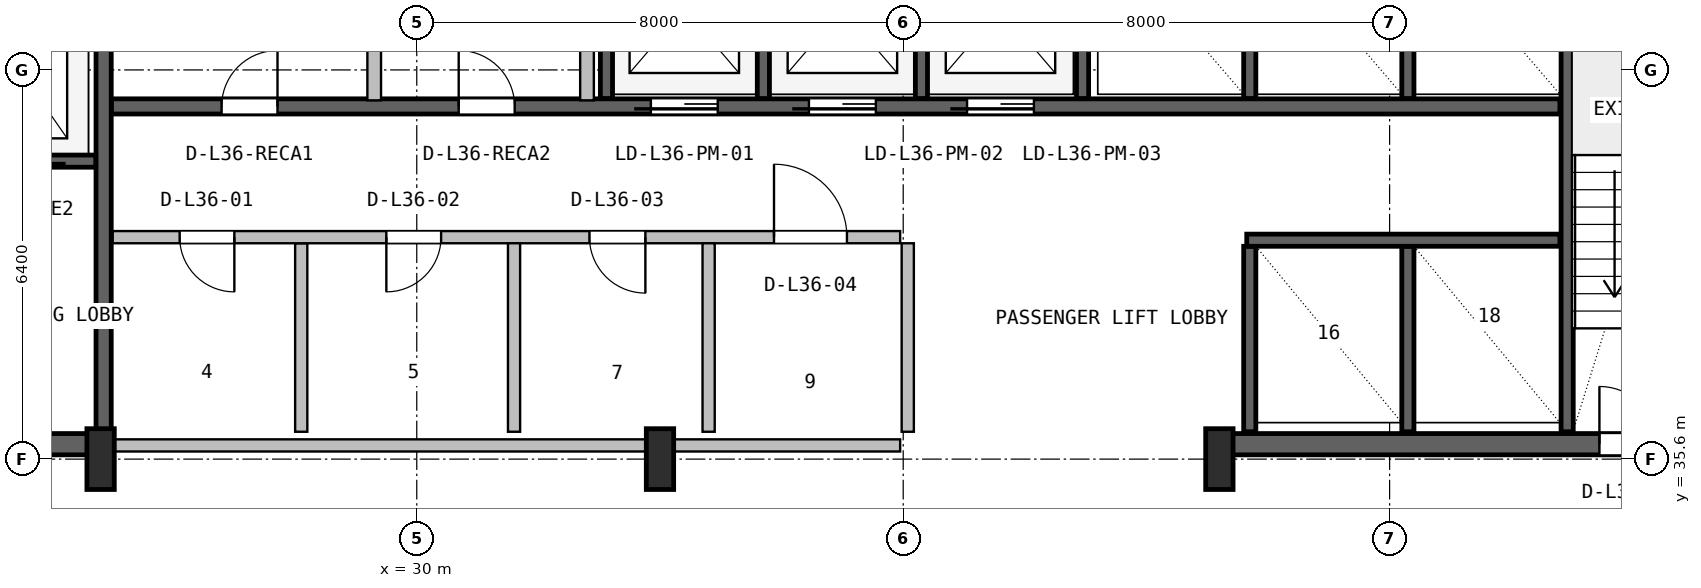
"""IFC4 building model, lengths in metres.
Left out: names, types, materials, properties, quantities, classifications, styles, units other than length and angle.
Written with IfcOpenShell. Run it as: python <this file> out.ifc"""

import sys

from ifc_helpers import new_model, si_unit, direction, frame, frame_2d, origin, origin_2d, place, context, subcontext, project, spatial, rectangle, i_section, extrude, source, transform, mapped, element, fill, save


model = new_model("IFC4")
c1 = context("Model", 3, precision=1e-05, world=origin(), true_north=direction((0.0, 1.0)))
c2 = subcontext(c1, "Body", "Model", "MODEL_VIEW")
j1 = project(units=[si_unit("LENGTHUNIT", "METRE"), si_unit("PLANEANGLEUNIT", "RADIAN")], contexts=[c1])
p1 = place(None, origin())
s1 = spatial("IfcSite", under=j1, at=p1, CompositionType="ELEMENT")
p2 = place(p1, origin())
s2 = spatial("IfcBuilding", under=s1, at=p2, CompositionType="ELEMENT")
p3 = place(p2, frame((0.0, 0.0, 149.6)))
s3 = spatial("IfcBuildingStorey", under=s2, at=p3, CompositionType="ELEMENT", Elevation=149.6)
p4 = place(p3, frame((15.67, 35.845, 0.0), z_axis=(0.0, 0.0, 1.0), x_axis=(1.0, 0.0, 0.0)))
e1 = element("IfcWall", 1, at=p4, inside=s3, PredefinedType="SHEAR", context=c2, shape_type="SweptSolid", body=[
    extrude(rectangle(XDim=9.13, YDim=0.35, at=frame_2d((4.565, 0.0))), origin(), (0.0, 0.0, 1.0), 3.55),
])
p5 = place(p4, frame((5.4, 0.0, 0.0)))
e2 = element("IfcOpeningElement", 2, at=p5, cuts=e1, PredefinedType="OPENING", context=c2, shape_type="SweptSolid", body=[
    extrude(rectangle(XDim=1.0, YDim=2.1, at=frame_2d((0.5, 1.05))), frame((0.0, 0.185, 0.0), z_axis=(0.0, -1.0, 0.0), x_axis=(1.0, 0.0, 0.0)), (0.0, 0.0, 1.0), 0.37),
])
p6 = place(p3, frame((43.2, 35.845, 0.0), z_axis=(0.0, 0.0, 1.0), x_axis=(1.0, 0.0, 0.0)))
e3 = element("IfcWall", 3, at=p6, inside=s3, PredefinedType="SHEAR", context=c2, shape_type="SweptSolid", body=[
    extrude(rectangle(XDim=9.13, YDim=0.35, at=frame_2d((4.565, 0.0))), origin(), (0.0, 0.0, 1.0), 3.55),
])
p7 = place(p6, frame((6.25, 0.0, 0.0)))
e4 = element("IfcOpeningElement", 4, at=p7, cuts=e3, PredefinedType="OPENING", context=c2, shape_type="SweptSolid", body=[
    extrude(rectangle(XDim=0.95, YDim=2.1, at=frame_2d((0.475, 1.05))), frame((0.0, 0.185, 0.0), z_axis=(0.0, -1.0, 0.0), x_axis=(1.0, 0.0, 0.0)), (0.0, 0.0, 1.0), 0.37),
])
m1 = source(origin(), c2, "Body", "SweptSolid", [
    extrude(i_section(OverallWidth=0.45, OverallDepth=1.0, WebThickness=0.016, FlangeThickness=0.03, FilletRadius=0.016, at=origin_2d()), origin(), (0.0, 0.0, 1.0), 3.8),
])
for number, where, z_axis, x_axis in (
    (5, (24.8, 35.6, 0.0), (0.0, 0.0, 1.0), (1.0, 0.0, 0.0)),
    (6, (34.0, 35.6, 0.0), (0.0, 0.0, 1.0), (1.0, 0.0, 0.0)),
    (7, (43.2, 35.6, 0.0), (0.0, 0.0, 1.0), (1.0, 0.0, 0.0)),
):
    element("IfcColumn", number, at=place(p3, frame(where, z_axis=z_axis, x_axis=x_axis)), inside=s3, PredefinedType="COLUMN", context=c2, shape_type="MappedRepresentation", body=[
        mapped(m1, transform((0.0, 0.0, 0.0), x_axis=(1.0, 0.0, 0.0), y_axis=(0.0, 1.0, 0.0), z_axis=(0.0, 0.0, 1.0), scale=1.0)),
    ])
p8 = place(p3, frame((24.85, 36.05, 0.0), z_axis=(0.0, 0.0, 1.0), x_axis=(0.0, 1.0, 0.0)))
e8 = element("IfcWall", 8, at=p8, inside=s3, PredefinedType="SHEAR", context=c2, shape_type="SweptSolid", body=[
    extrude(rectangle(XDim=10.45, YDim=0.25, at=frame_2d((5.225, 0.0))), origin(), (0.0, 0.0, 1.0), 3.55),
])
p9 = place(p3, frame((19.2, 40.5, 0.0), z_axis=(0.0, 0.0, 1.0), x_axis=(1.0, 0.0, 0.0)))
e9 = element("IfcWall", 9, at=p9, inside=s3, PredefinedType="SHEAR", context=c2, shape_type="SweptSolid", body=[
    extrude(rectangle(XDim=5.52, YDim=0.2, at=frame_2d((2.76, 0.0))), origin(), (0.0, 0.0, 1.0), 3.55),
])
p10 = place(p9, frame((1.05, 0.0, 0.0)))
e10 = element("IfcOpeningElement", 10, at=p10, cuts=e9, PredefinedType="OPENING", context=c2, shape_type="SweptSolid", body=[
    extrude(rectangle(XDim=1.1, YDim=2.18, at=frame_2d((0.55, 1.09))), frame((0.0, 0.11, 0.0), z_axis=(0.0, -1.0, 0.0), x_axis=(1.0, 0.0, 0.0)), (0.0, 0.0, 1.0), 0.22),
])
p11 = place(p9, frame((3.65, 0.0, 0.0)))
e11 = element("IfcOpeningElement", 11, at=p11, cuts=e9, PredefinedType="OPENING", context=c2, shape_type="SweptSolid", body=[
    extrude(rectangle(XDim=1.1, YDim=2.18, at=frame_2d((0.55, 1.09))), frame((0.0, 0.11, 0.0), z_axis=(0.0, -1.0, 0.0), x_axis=(1.0, 0.0, 0.0)), (0.0, 0.0, 1.0), 0.22),
])
p12 = place(p3, frame((48.92, 36.05, 0.0), z_axis=(0.0, 0.0, 1.0), x_axis=(0.0, 1.0, 0.0)))
e12 = element("IfcWall", 12, at=p12, inside=s3, PredefinedType="SHEAR", context=c2, shape_type="SweptSolid", body=[
    extrude(rectangle(XDim=10.5, YDim=0.2, at=frame_2d((5.25, 0.0))), origin(), (0.0, 0.0, 1.0), 3.55),
])
p13 = place(p3, frame((24.98, 41.4, 0.0), z_axis=(0.0, 0.0, 1.0), x_axis=(1.0, 0.0, 0.0)))
e13 = element("IfcWall", 13, at=p13, inside=s3, PredefinedType="SHEAR", context=c2, shape_type="SweptSolid", body=[
    extrude(rectangle(XDim=23.82, YDim=0.25, at=frame_2d((11.91, 0.0))), origin(), (0.0, 0.0, 1.0), 3.55),
])
p14 = place(p13, frame((8.87, 0.0, 0.0)))
e14 = element("IfcOpeningElement", 14, at=p14, cuts=e13, PredefinedType="OPENING", context=c2, shape_type="SweptSolid", body=[
    extrude(rectangle(XDim=1.1, YDim=2.18, at=frame_2d((0.55, 1.09))), frame((0.0, 0.135, 0.0), z_axis=(0.0, -1.0, 0.0), x_axis=(1.0, 0.0, 0.0)), (0.0, 0.0, 1.0), 0.27),
])
p15 = place(p13, frame((11.47, 0.0, 0.0)))
e15 = element("IfcOpeningElement", 15, at=p15, cuts=e13, PredefinedType="OPENING", context=c2, shape_type="SweptSolid", body=[
    extrude(rectangle(XDim=1.1, YDim=2.18, at=frame_2d((0.55, 1.09))), frame((0.0, 0.135, 0.0), z_axis=(0.0, -1.0, 0.0), x_axis=(1.0, 0.0, 0.0)), (0.0, 0.0, 1.0), 0.27),
])
p16 = place(p13, frame((14.07, 0.0, 0.0)))
e16 = element("IfcOpeningElement", 16, at=p16, cuts=e13, PredefinedType="OPENING", context=c2, shape_type="SweptSolid", body=[
    extrude(rectangle(XDim=1.1, YDim=2.18, at=frame_2d((0.55, 1.09))), frame((0.0, 0.135, 0.0), z_axis=(0.0, -1.0, 0.0), x_axis=(1.0, 0.0, 0.0)), (0.0, 0.0, 1.0), 0.27),
])
p17 = place(p13, frame((1.81, 0.0, 0.0)))
e17 = element("IfcOpeningElement", 17, at=p17, cuts=e13, PredefinedType="OPENING", context=c2, shape_type="SweptSolid", body=[
    extrude(rectangle(XDim=0.92, YDim=2.08, at=frame_2d((0.46, 1.04))), frame((0.0, 0.135, 0.0), z_axis=(0.0, -1.0, 0.0), x_axis=(1.0, 0.0, 0.0)), (0.0, 0.0, 1.0), 0.27),
])
p18 = place(p13, frame((5.71, 0.0, 0.0)))
e18 = element("IfcOpeningElement", 18, at=p18, cuts=e13, PredefinedType="OPENING", context=c2, shape_type="SweptSolid", body=[
    extrude(rectangle(XDim=0.92, YDim=2.08, at=frame_2d((0.46, 1.04))), frame((0.0, 0.135, 0.0), z_axis=(0.0, -1.0, 0.0), x_axis=(1.0, 0.0, 0.0)), (0.0, 0.0, 1.0), 0.27),
])
p19 = place(p3, frame((33.12, 41.53, 0.0), z_axis=(0.0, 0.0, 1.0), x_axis=(0.0, 1.0, 0.0)))
e19 = element("IfcWall", 19, at=p19, inside=s3, PredefinedType="SHEAR", context=c2, shape_type="SweptSolid", body=[
    extrude(rectangle(XDim=5.02, YDim=0.2, at=frame_2d((2.51, 0.0))), origin(), (0.0, 0.0, 1.0), 3.55),
])
for number, where, z_axis, x_axis in (
    (20, (35.7, 41.53, 0.0), (0.0, 0.0, 1.0), (0.0, 1.0, 0.0)),
    (21, (38.3, 41.53, 0.0), (0.0, 0.0, 1.0), (0.0, 1.0, 0.0)),
):
    element("IfcWall", number, at=place(p3, frame(where, z_axis=z_axis, x_axis=x_axis)), inside=s3, PredefinedType="SHEAR", context=c2, shape_type="SweptSolid", body=[
        extrude(rectangle(XDim=2.87, YDim=0.2, at=frame_2d((1.435, 0.0))), origin(), (0.0, 0.0, 1.0), 3.55),
    ])
p20 = place(p3, frame((40.95, 41.53, 0.0), z_axis=(0.0, 0.0, 1.0), x_axis=(0.0, 1.0, 0.0)))
e22 = element("IfcWall", 22, at=p20, inside=s3, PredefinedType="SHEAR", context=c2, shape_type="SweptSolid", body=[
    extrude(rectangle(XDim=5.02, YDim=0.2, at=frame_2d((2.51, 0.0))), origin(), (0.0, 0.0, 1.0), 3.55),
])
for number, where, z_axis, x_axis in (
    (23, (43.7, 41.53, 0.0), (0.0, 0.0, 1.0), (0.0, 1.0, 0.0)),
    (24, (46.3, 41.53, 0.0), (0.0, 0.0, 1.0), (0.0, 1.0, 0.0)),
):
    element("IfcWall", number, at=place(p3, frame(where, z_axis=z_axis, x_axis=x_axis)), inside=s3, PredefinedType="SHEAR", context=c2, shape_type="SweptSolid", body=[
        extrude(rectangle(XDim=2.87, YDim=0.2, at=frame_2d((1.435, 0.0))), origin(), (0.0, 0.0, 1.0), 3.55),
    ])
for number, where, z_axis, x_axis in (
    (25, (43.7, 36.05, 0.0), (0.0, 0.0, 1.0), (0.0, 1.0, 0.0)),
    (26, (46.3, 36.05, 0.0), (0.0, 0.0, 1.0), (0.0, 1.0, 0.0)),
):
    element("IfcWall", number, at=place(p3, frame(where, z_axis=z_axis, x_axis=x_axis)), inside=s3, PredefinedType="SHEAR", context=c2, shape_type="SweptSolid", body=[
        extrude(rectangle(XDim=3.05, YDim=0.2, at=frame_2d((1.525, 0.0))), origin(), (0.0, 0.0, 1.0), 3.55),
    ])
p21 = place(p3, frame((43.65, 39.2, 0.0), z_axis=(0.0, 0.0, 1.0), x_axis=(1.0, 0.0, 0.0)))
e27 = element("IfcWall", 27, at=p21, inside=s3, PredefinedType="SHEAR", context=c2, shape_type="SweptSolid", body=[
    extrude(rectangle(XDim=5.15, YDim=0.2, at=frame_2d((2.575, 0.0))), origin(), (0.0, 0.0, 1.0), 3.55),
])
p22 = place(p3, frame((25.0, 35.825, 0.0), z_axis=(0.0, 0.0, 1.0), x_axis=(1.0, 0.0, 0.0)))
e28 = element("IfcWall", 28, at=p22, inside=s3, PredefinedType="SOLIDWALL", context=c2, shape_type="SweptSolid", body=[
    extrude(rectangle(XDim=12.95, YDim=0.2, at=frame_2d((6.475, 0.0))), origin(), (0.0, 0.0, 1.0), 2.575),
])
p23 = place(p3, frame((28.1, 36.05, 0.0), z_axis=(0.0, 0.0, 1.0), x_axis=(0.0, 1.0, 0.0)))
e29 = element("IfcWall", 29, at=p23, inside=s3, PredefinedType="PLUMBINGWALL", context=c2, shape_type="SweptSolid", body=[
    extrude(rectangle(XDim=3.1, YDim=0.2, at=frame_2d((1.55, 0.0))), origin(), (0.0, 0.0, 1.0), 3.53),
])
p24 = place(p3, frame((25.0, 39.25, 0.0), z_axis=(0.0, 0.0, 1.0), x_axis=(1.0, 0.0, 0.0)))
e30 = element("IfcWall", 30, at=p24, inside=s3, PredefinedType="SOLIDWALL", context=c2, shape_type="SweptSolid", body=[
    extrude(rectangle(XDim=12.95, YDim=0.2, at=frame_2d((6.475, 0.0))), origin(), (0.0, 0.0, 1.0), 3.53),
])
p25 = place(p24, frame((1.1, 0.0, 0.0)))
e31 = element("IfcOpeningElement", 31, at=p25, cuts=e30, PredefinedType="OPENING", context=c2, shape_type="SweptSolid", body=[
    extrude(rectangle(XDim=0.9, YDim=2.06, at=frame_2d((0.45, 1.03))), frame((0.0, 0.11, 0.0), z_axis=(0.0, -1.0, 0.0), x_axis=(1.0, 0.0, 0.0)), (0.0, 0.0, 1.0), 0.22),
])
p26 = place(p24, frame((4.5, 0.0, 0.0)))
e32 = element("IfcOpeningElement", 32, at=p26, cuts=e30, PredefinedType="OPENING", context=c2, shape_type="SweptSolid", body=[
    extrude(rectangle(XDim=0.9, YDim=2.06, at=frame_2d((0.45, 1.03))), frame((0.0, 0.11, 0.0), z_axis=(0.0, -1.0, 0.0), x_axis=(1.0, 0.0, 0.0)), (0.0, 0.0, 1.0), 0.22),
])
p27 = place(p24, frame((7.84, 0.0, 0.0)))
e33 = element("IfcOpeningElement", 33, at=p27, cuts=e30, PredefinedType="OPENING", context=c2, shape_type="SweptSolid", body=[
    extrude(rectangle(XDim=0.92, YDim=2.08, at=frame_2d((0.46, 1.04))), frame((0.0, 0.11, 0.0), z_axis=(0.0, -1.0, 0.0), x_axis=(1.0, 0.0, 0.0)), (0.0, 0.0, 1.0), 0.22),
])
p28 = place(p24, frame((10.875, 0.0, 0.0)))
e34 = element("IfcOpeningElement", 34, at=p28, cuts=e30, PredefinedType="OPENING", context=c2, shape_type="SweptSolid", body=[
    extrude(rectangle(XDim=1.2, YDim=2.1, at=frame_2d((0.6, 1.05))), frame((0.0, 0.11, 0.0), z_axis=(0.0, -1.0, 0.0), x_axis=(1.0, 0.0, 0.0)), (0.0, 0.0, 1.0), 0.22),
])
p29 = place(p3, frame((31.6, 36.05, 0.0), z_axis=(0.0, 0.0, 1.0), x_axis=(0.0, 1.0, 0.0)))
e35 = element("IfcWall", 35, at=p29, inside=s3, PredefinedType="PLUMBINGWALL", context=c2, shape_type="SweptSolid", body=[
    extrude(rectangle(XDim=3.1, YDim=0.2, at=frame_2d((1.55, 0.0))), origin(), (0.0, 0.0, 1.0), 3.53),
])
for number, where, z_axis, x_axis in (
    (36, (34.8, 36.05, 0.0), (0.0, 0.0, 1.0), (0.0, 1.0, 0.0)),
    (37, (38.075, 36.05, 0.0), (0.0, 0.0, 1.0), (0.0, 1.0, 0.0)),
):
    element("IfcWall", number, at=place(p3, frame(where, z_axis=z_axis, x_axis=x_axis)), inside=s3, PredefinedType="SOLIDWALL", context=c2, shape_type="SweptSolid", body=[
        extrude(rectangle(XDim=3.1, YDim=0.2, at=frame_2d((1.55, 0.0))), origin(), (0.0, 0.0, 1.0), 3.53),
    ])
p30 = place(p3, frame((29.3, 41.5, 0.0), z_axis=(0.0, 0.0, 1.0), x_axis=(0.0, 1.0, 0.0)))
e38 = element("IfcWall", 38, at=p30, inside=s3, PredefinedType="PARTITIONING", context=c2, shape_type="SweptSolid", body=[
    extrude(rectangle(XDim=2.288, YDim=0.225, at=frame_2d((1.144, 0.0))), origin(), (0.0, 0.0, 1.0), 3.53),
])
p31 = place(p3, frame((32.8, 41.5, 0.0), z_axis=(0.0, 0.0, 1.0), x_axis=(0.0, 1.0, 0.0)))
e39 = element("IfcWall", 39, at=p31, inside=s3, PredefinedType="PARTITIONING", context=c2, shape_type="SweptSolid", body=[
    extrude(rectangle(XDim=5.02, YDim=0.225, at=frame_2d((2.51, 0.0))), origin(), (0.0, 0.0, 1.0), 3.53),
])
m2 = source(origin(), c2, "Body", "SweptSolid", [
    extrude(rectangle(XDim=0.95, YDim=2.1, at=frame_2d((0.475, 1.05))), frame((0.0, 0.025, 0.0), z_axis=(0.0, -1.0, 0.0), x_axis=(1.0, 0.0, 0.0)), (0.0, 0.0, 1.0), 0.05),
])
p32 = place(p7, origin())
e40 = element("IfcDoor", 40, at=p32, inside=s3, OperationType="SINGLE_SWING_LEFT", PredefinedType="DOOR", context=c2, shape_type="MappedRepresentation", body=[
    mapped(m2, transform((0.0, 0.0, 0.0), x_axis=(1.0, 0.0, 0.0), y_axis=(0.0, 1.0, 0.0), z_axis=(0.0, 0.0, 1.0), scale=1.0)),
])
fill(e4, e40)
m3 = source(origin(), c2, "Body", "SweptSolid", [
    extrude(rectangle(XDim=1.1, YDim=2.18, at=frame_2d((0.55, 1.09))), frame((0.0, 0.025, 0.0), z_axis=(0.0, -1.0, 0.0), x_axis=(1.0, 0.0, 0.0)), (0.0, 0.0, 1.0), 0.05),
])
p33 = place(p14, frame((1.1, 0.0, 0.0), z_axis=(0.0, 0.0, 1.0), x_axis=(-1.0, 0.0, 0.0)))
e41 = element("IfcDoor", 41, at=p33, inside=s3, OperationType="SLIDING_TO_LEFT", PredefinedType="DOOR", context=c2, shape_type="MappedRepresentation", body=[
    mapped(m3, transform((0.0, 0.0, 0.0), x_axis=(1.0, 0.0, 0.0), y_axis=(0.0, 1.0, 0.0), z_axis=(0.0, 0.0, 1.0), scale=1.0)),
])
fill(e14, e41)
p34 = place(p15, frame((1.1, 0.0, 0.0), z_axis=(0.0, 0.0, 1.0), x_axis=(-1.0, 0.0, 0.0)))
e42 = element("IfcDoor", 42, at=p34, inside=s3, OperationType="SLIDING_TO_LEFT", PredefinedType="DOOR", context=c2, shape_type="MappedRepresentation", body=[
    mapped(m3, transform((0.0, 0.0, 0.0), x_axis=(1.0, 0.0, 0.0), y_axis=(0.0, 1.0, 0.0), z_axis=(0.0, 0.0, 1.0), scale=1.0)),
])
fill(e15, e42)
p35 = place(p16, frame((1.1, 0.0, 0.0), z_axis=(0.0, 0.0, 1.0), x_axis=(-1.0, 0.0, 0.0)))
e43 = element("IfcDoor", 43, at=p35, inside=s3, OperationType="SLIDING_TO_LEFT", PredefinedType="DOOR", context=c2, shape_type="MappedRepresentation", body=[
    mapped(m3, transform((0.0, 0.0, 0.0), x_axis=(1.0, 0.0, 0.0), y_axis=(0.0, 1.0, 0.0), z_axis=(0.0, 0.0, 1.0), scale=1.0)),
])
fill(e16, e43)
m4 = source(origin(), c2, "Body", "SweptSolid", [
    extrude(rectangle(XDim=0.92, YDim=2.08, at=frame_2d((0.46, 1.04))), frame((0.0, 0.025, 0.0), z_axis=(0.0, -1.0, 0.0), x_axis=(1.0, 0.0, 0.0)), (0.0, 0.0, 1.0), 0.05),
])
p36 = place(p17, origin())
e44 = element("IfcDoor", 44, at=p36, inside=s3, OperationType="SINGLE_SWING_RIGHT", PredefinedType="DOOR", context=c2, shape_type="MappedRepresentation", body=[
    mapped(m4, transform((0.0, 0.0, 0.0), x_axis=(1.0, 0.0, 0.0), y_axis=(0.0, 1.0, 0.0), z_axis=(0.0, 0.0, 1.0), scale=1.0)),
])
fill(e17, e44)
p37 = place(p18, origin())
e45 = element("IfcDoor", 45, at=p37, inside=s3, OperationType="SINGLE_SWING_LEFT", PredefinedType="DOOR", context=c2, shape_type="MappedRepresentation", body=[
    mapped(m4, transform((0.0, 0.0, 0.0), x_axis=(1.0, 0.0, 0.0), y_axis=(0.0, 1.0, 0.0), z_axis=(0.0, 0.0, 1.0), scale=1.0)),
])
fill(e18, e45)
m5 = source(origin(), c2, "Body", "SweptSolid", [
    extrude(rectangle(XDim=0.9, YDim=2.06, at=frame_2d((0.45, 1.03))), frame((0.0, 0.025, 0.0), z_axis=(0.0, -1.0, 0.0), x_axis=(1.0, 0.0, 0.0)), (0.0, 0.0, 1.0), 0.05),
])
p38 = place(p25, frame((0.9, 0.0, 0.0), z_axis=(0.0, 0.0, 1.0), x_axis=(-1.0, 0.0, 0.0)))
e46 = element("IfcDoor", 46, at=p38, inside=s3, OperationType="SINGLE_SWING_RIGHT", PredefinedType="DOOR", context=c2, shape_type="MappedRepresentation", body=[
    mapped(m5, transform((0.0, 0.0, 0.0), x_axis=(1.0, 0.0, 0.0), y_axis=(0.0, 1.0, 0.0), z_axis=(0.0, 0.0, 1.0), scale=1.0)),
])
fill(e31, e46)
p39 = place(p26, frame((0.9, 0.0, 0.0), z_axis=(0.0, 0.0, 1.0), x_axis=(-1.0, 0.0, 0.0)))
e47 = element("IfcDoor", 47, at=p39, inside=s3, OperationType="SINGLE_SWING_LEFT", PredefinedType="DOOR", context=c2, shape_type="MappedRepresentation", body=[
    mapped(m5, transform((0.0, 0.0, 0.0), x_axis=(1.0, 0.0, 0.0), y_axis=(0.0, 1.0, 0.0), z_axis=(0.0, 0.0, 1.0), scale=1.0)),
])
fill(e32, e47)
p40 = place(p27, frame((0.92, 0.0, 0.0), z_axis=(0.0, 0.0, 1.0), x_axis=(-1.0, 0.0, 0.0)))
e48 = element("IfcDoor", 48, at=p40, inside=s3, OperationType="SINGLE_SWING_RIGHT", PredefinedType="DOOR", context=c2, shape_type="MappedRepresentation", body=[
    mapped(m4, transform((0.0, 0.0, 0.0), x_axis=(1.0, 0.0, 0.0), y_axis=(0.0, 1.0, 0.0), z_axis=(0.0, 0.0, 1.0), scale=1.0)),
])
fill(e33, e48)
m6 = source(origin(), c2, "Body", "SweptSolid", [
    extrude(rectangle(XDim=1.2, YDim=2.1, at=frame_2d((0.6, 1.05))), frame((0.0, 0.025, 0.0), z_axis=(0.0, -1.0, 0.0), x_axis=(1.0, 0.0, 0.0)), (0.0, 0.0, 1.0), 0.05),
])
p41 = place(p28, origin())
e49 = element("IfcDoor", 49, at=p41, inside=s3, OperationType="SINGLE_SWING_LEFT", PredefinedType="DOOR", context=c2, shape_type="MappedRepresentation", body=[
    mapped(m6, transform((0.0, 0.0, 0.0), x_axis=(1.0, 0.0, 0.0), y_axis=(0.0, 1.0, 0.0), z_axis=(0.0, 0.0, 1.0), scale=1.0)),
])
fill(e34, e49)
save(model, sys.argv[1])
